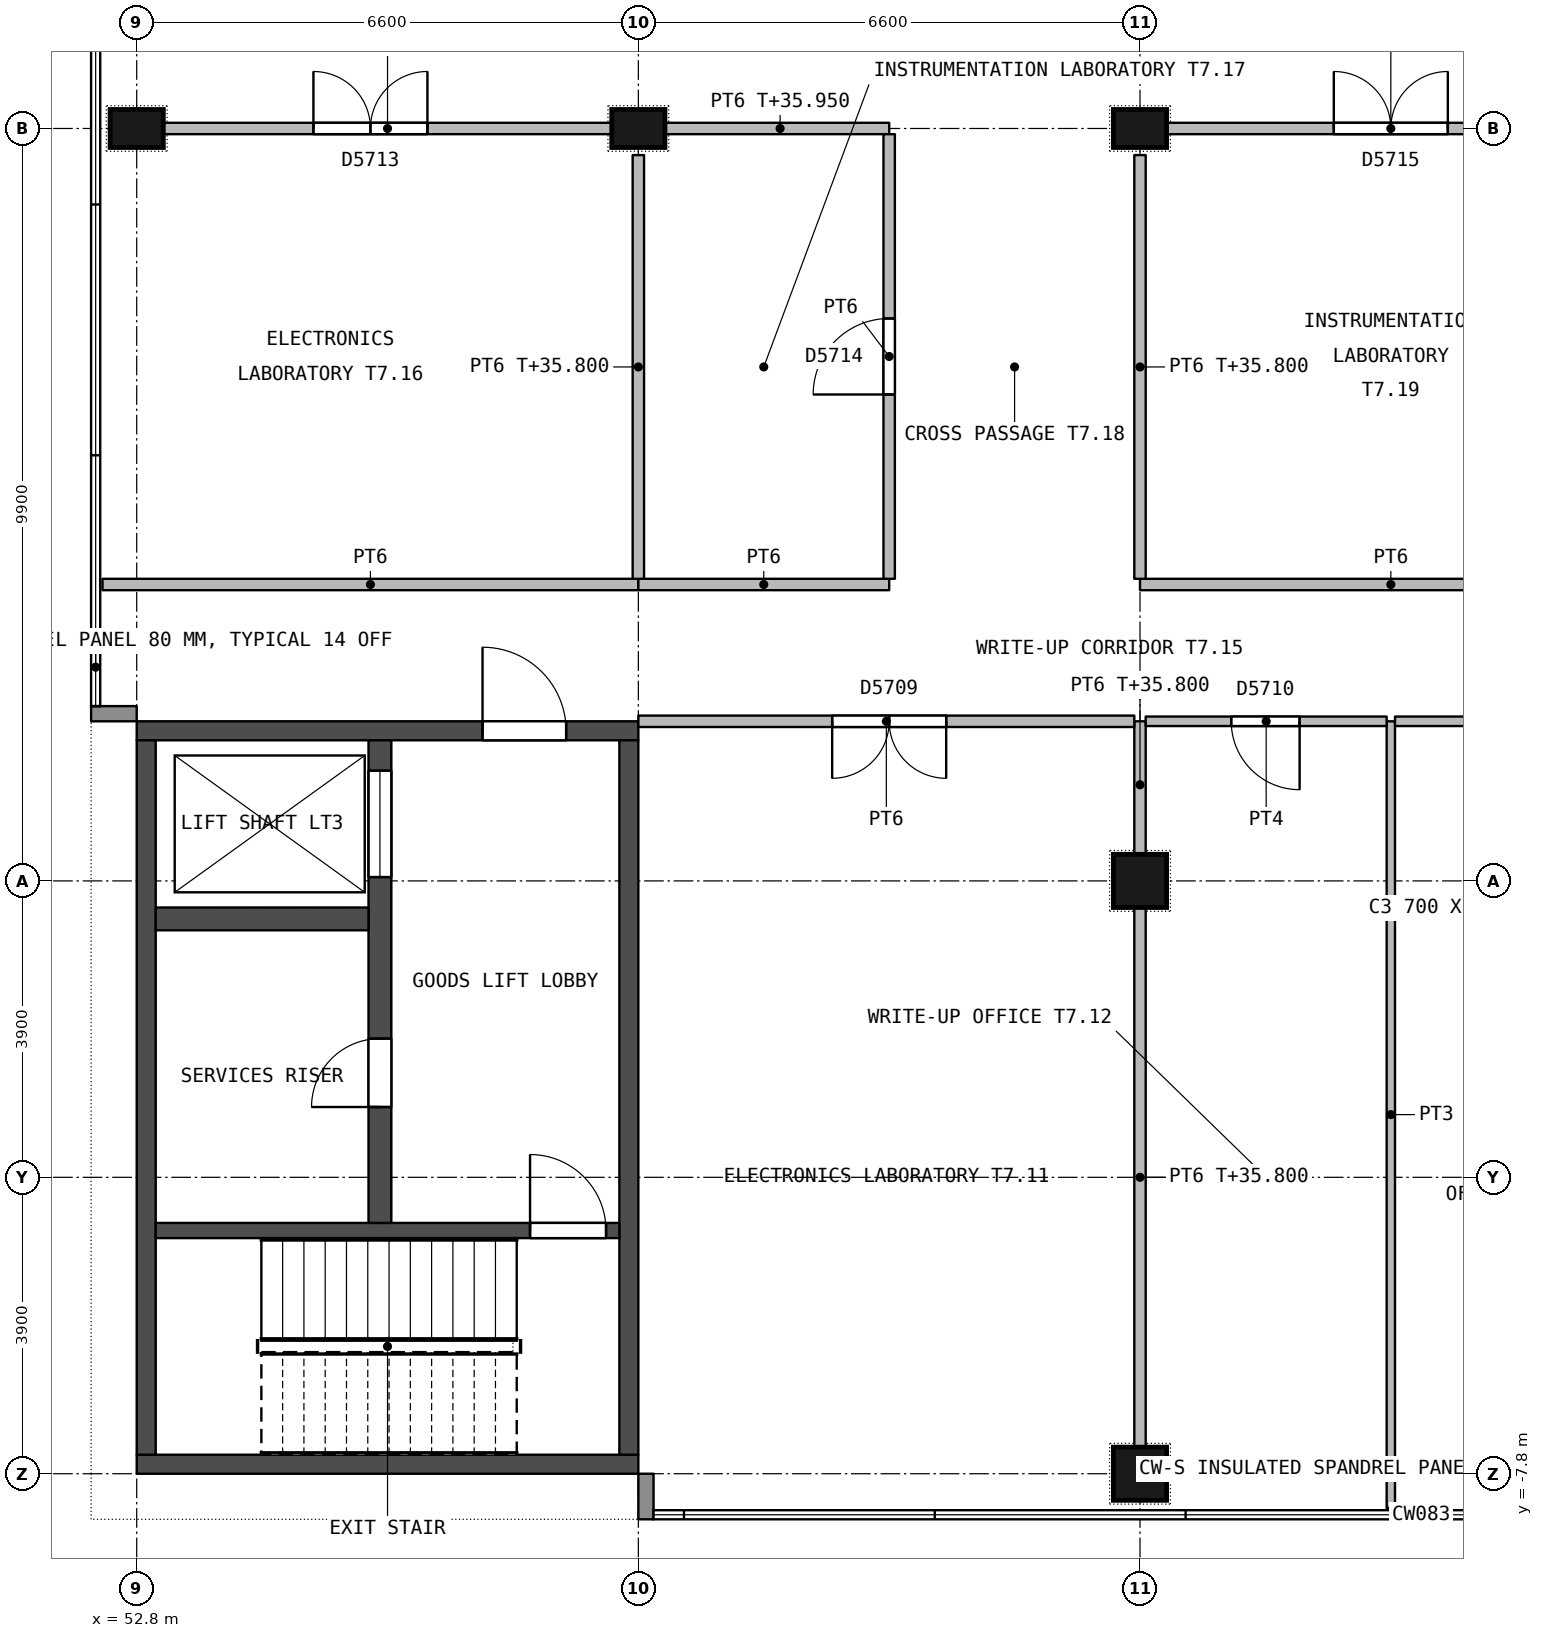
"""IFC4 building model, lengths in metres.
Left out: names, types, materials, properties, quantities, classifications, styles, units other than length and angle.
Written with IfcOpenShell. Run it as: python <this file> out.ifc"""

import sys

from ifc_helpers import new_model, si_unit, direction, frame, frame_2d, origin, origin_2d, place, context, subcontext, project, spatial, rectangle, extrude, element, fill, save


model = new_model("IFC4")
c1 = context("Model", 3, precision=1e-05, world=origin(), true_north=direction((0.0, 1.0)))
c2 = subcontext(c1, "Body", "Model", "MODEL_VIEW")
j1 = project(units=[si_unit("LENGTHUNIT", "METRE"), si_unit("PLANEANGLEUNIT", "RADIAN")], contexts=[c1])
p1 = place(None, origin())
s1 = spatial("IfcSite", under=j1, at=p1, CompositionType="ELEMENT")
p2 = place(p1, origin())
s2 = spatial("IfcBuilding", under=s1, at=p2, CompositionType="ELEMENT")
p3 = place(p2, frame((0.0, 0.0, 32.4)))
s3 = spatial("IfcBuildingStorey", under=s2, at=p3, CompositionType="ELEMENT", Elevation=32.4)
for number, where, z_axis, x_axis in (
    (1, (52.8, 9.9, 0.0), (0.0, 0.0, 1.0), (1.0, 0.0, 0.0)),
    (2, (59.4, 9.9, 0.0), (0.0, 0.0, 1.0), (1.0, 0.0, 0.0)),
):
    element("IfcColumn", number, at=place(p3, frame(where, z_axis=z_axis, x_axis=x_axis)), inside=s3, PredefinedType="COLUMN", context=c2, shape_type="SweptSolid", body=[
        extrude(rectangle(XDim=0.7, YDim=0.5, at=origin_2d()), origin(), (0.0, 0.0, 1.0), 4.5),
    ])
for number, where, z_axis, x_axis in (
    (3, (66.0, -7.8, 0.0), (0.0, 0.0, 1.0), (1.0, 0.0, 0.0)),
    (4, (66.0, 0.0, 0.0), (0.0, 0.0, 1.0), (1.0, 0.0, 0.0)),
):
    element("IfcColumn", number, at=place(p3, frame(where, z_axis=z_axis, x_axis=x_axis)), inside=s3, PredefinedType="COLUMN", context=c2, shape_type="SweptSolid", body=[
        extrude(rectangle(XDim=0.7, YDim=0.7, at=origin_2d()), origin(), (0.0, 0.0, 1.0), 4.5),
    ])
p4 = place(p3, frame((66.0, 9.9, 0.0), z_axis=(0.0, 0.0, 1.0), x_axis=(1.0, 0.0, 0.0)))
e5 = element("IfcColumn", 5, at=p4, inside=s3, PredefinedType="COLUMN", context=c2, shape_type="SweptSolid", body=[
    extrude(rectangle(XDim=0.7, YDim=0.5, at=origin_2d()), origin(), (0.0, 0.0, 1.0), 4.5),
])
p5 = place(p3, frame((59.4, 1.975, 0.0), z_axis=(0.0, 0.0, 1.0), x_axis=(-1.0, 0.0, 0.0)))
e6 = element("IfcWall", 6, at=p5, inside=s3, PredefinedType="SHEAR", context=c2, shape_type="SweptSolid", body=[
    extrude(rectangle(XDim=6.6, YDim=0.25, at=frame_2d((3.3, 0.0))), origin(), (0.0, 0.0, 1.0), 4.2),
])
p6 = place(p5, frame((0.95, 0.0, 0.0)))
e7 = element("IfcOpeningElement", 7, at=p6, cuts=e6, PredefinedType="OPENING", context=c2, shape_type="SweptSolid", body=[
    extrude(rectangle(XDim=1.1, YDim=2.1, at=frame_2d((0.55, 1.05))), frame((0.0, 0.135, 0.0), z_axis=(0.0, -1.0, 0.0), x_axis=(1.0, 0.0, 0.0)), (0.0, 0.0, 1.0), 0.27),
])
p7 = place(p3, frame((59.4, -7.675, 0.0), z_axis=(0.0, 0.0, 1.0), x_axis=(-1.0, 0.0, 0.0)))
e8 = element("IfcWall", 8, at=p7, inside=s3, PredefinedType="SHEAR", context=c2, shape_type="SweptSolid", body=[
    extrude(rectangle(XDim=6.6, YDim=0.25, at=frame_2d((3.3, 0.0))), origin(), (0.0, 0.0, 1.0), 4.2),
])
for number, where, z_axis, x_axis in (
    (9, (59.275, 1.85, 0.0), (0.0, 0.0, 1.0), (0.0, -1.0, 0.0)),
    (10, (52.925, 1.85, 0.0), (0.0, 0.0, 1.0), (0.0, -1.0, 0.0)),
):
    element("IfcWall", number, at=place(p3, frame(where, z_axis=z_axis, x_axis=x_axis)), inside=s3, PredefinedType="SHEAR", context=c2, shape_type="SweptSolid", body=[
        extrude(rectangle(XDim=9.4, YDim=0.25, at=frame_2d((4.7, 0.0))), origin(), (0.0, 0.0, 1.0), 4.2),
    ])
p8 = place(p3, frame((59.15, -4.6, 0.0), z_axis=(0.0, 0.0, 1.0), x_axis=(-1.0, 0.0, 0.0)))
e11 = element("IfcWall", 11, at=p8, inside=s3, PredefinedType="SHEAR", context=c2, shape_type="SweptSolid", body=[
    extrude(rectangle(XDim=6.1, YDim=0.2, at=frame_2d((3.05, 0.0))), origin(), (0.0, 0.0, 1.0), 4.2),
])
p9 = place(p8, frame((0.175, 0.0, 0.0)))
e12 = element("IfcOpeningElement", 12, at=p9, cuts=e11, PredefinedType="OPENING", context=c2, shape_type="SweptSolid", body=[
    extrude(rectangle(XDim=1.0, YDim=2.1, at=frame_2d((0.5, 1.05))), frame((0.0, 0.11, 0.0), z_axis=(0.0, -1.0, 0.0), x_axis=(1.0, 0.0, 0.0)), (0.0, 0.0, 1.0), 0.22),
])
p10 = place(p3, frame((56.0, 1.85, 0.0), z_axis=(0.0, 0.0, 1.0), x_axis=(0.0, -1.0, 0.0)))
e13 = element("IfcWall", 13, at=p10, inside=s3, PredefinedType="SHEAR", context=c2, shape_type="SweptSolid", body=[
    extrude(rectangle(XDim=6.35, YDim=0.3, at=frame_2d((3.175, 0.0))), origin(), (0.0, 0.0, 1.0), 4.2),
])
p11 = place(p10, frame((3.925, 0.0, 0.0)))
e14 = element("IfcOpeningElement", 14, at=p11, cuts=e13, PredefinedType="OPENING", context=c2, shape_type="SweptSolid", body=[
    extrude(rectangle(XDim=0.9, YDim=2.1, at=frame_2d((0.45, 1.05))), frame((0.0, 0.16, 0.0), z_axis=(0.0, -1.0, 0.0), x_axis=(1.0, 0.0, 0.0)), (0.0, 0.0, 1.0), 0.32),
])
p12 = place(p10, frame((0.4, 0.0, 0.0)))
e15 = element("IfcOpeningElement", 15, at=p12, cuts=e13, PredefinedType="OPENING", context=c2, shape_type="SweptSolid", body=[
    extrude(rectangle(XDim=1.4, YDim=2.4, at=frame_2d((0.7, 1.2))), frame((0.0, 0.16, 0.0), z_axis=(0.0, -1.0, 0.0), x_axis=(1.0, 0.0, 0.0)), (0.0, 0.0, 1.0), 0.32),
])
p13 = place(p3, frame((55.85, -0.5, 0.0), z_axis=(0.0, 0.0, 1.0), x_axis=(-1.0, 0.0, 0.0)))
e16 = element("IfcWall", 16, at=p13, inside=s3, PredefinedType="SHEAR", context=c2, shape_type="SweptSolid", body=[
    extrude(rectangle(XDim=2.8, YDim=0.3, at=frame_2d((1.4, 0.0))), origin(), (0.0, 0.0, 1.0), 4.2),
])
p14 = place(p3, frame((59.5, -7.8, 0.0), z_axis=(0.0, 0.0, 1.0), x_axis=(0.0, -1.0, 0.0)))
e17 = element("IfcWall", 17, at=p14, inside=s3, PredefinedType="STANDARD", context=c2, shape_type="SweptSolid", body=[
    extrude(rectangle(XDim=0.6, YDim=0.2, at=frame_2d((0.3, 0.0))), origin(), (0.0, 0.0, 1.0), 3.55),
])
p15 = place(p3, frame((52.8, 2.2, 0.0), z_axis=(0.0, 0.0, 1.0), x_axis=(-1.0, 0.0, 0.0)))
e18 = element("IfcWall", 18, at=p15, inside=s3, PredefinedType="STANDARD", context=c2, shape_type="SweptSolid", body=[
    extrude(rectangle(XDim=0.6, YDim=0.2, at=frame_2d((0.3, 0.0))), origin(), (0.0, 0.0, 1.0), 3.55),
])
p16 = place(p3, frame((53.15, 9.9, 0.0), z_axis=(0.0, 0.0, 1.0), x_axis=(1.0, 0.0, 0.0)))
e19 = element("IfcWall", 19, at=p16, inside=s3, PredefinedType="PARTITIONING", context=c2, shape_type="SweptSolid", body=[
    extrude(rectangle(XDim=5.9, YDim=0.15, at=frame_2d((2.95, 0.0))), origin(), (0.0, 0.0, 1.0), 3.55),
])
p17 = place(p16, frame((1.975, 0.0, 0.0)))
e20 = element("IfcOpeningElement", 20, at=p17, cuts=e19, PredefinedType="OPENING", context=c2, shape_type="SweptSolid", body=[
    extrude(rectangle(XDim=1.5, YDim=2.1, at=frame_2d((0.75, 1.05))), frame((0.0, 0.085, 0.0), z_axis=(0.0, -1.0, 0.0), x_axis=(1.0, 0.0, 0.0)), (0.0, 0.0, 1.0), 0.17),
])
p18 = place(p3, frame((59.75, 9.9, 0.0), z_axis=(0.0, 0.0, 1.0), x_axis=(1.0, 0.0, 0.0)))
e21 = element("IfcWall", 21, at=p18, inside=s3, PredefinedType="PARTITIONING", context=c2, shape_type="SweptSolid", body=[
    extrude(rectangle(XDim=2.95, YDim=0.15, at=frame_2d((1.475, 0.0))), origin(), (0.0, 0.0, 1.0), 3.55),
])
p19 = place(p3, frame((66.35, 9.9, 0.0), z_axis=(0.0, 0.0, 1.0), x_axis=(1.0, 0.0, 0.0)))
e22 = element("IfcWall", 22, at=p19, inside=s3, PredefinedType="PARTITIONING", context=c2, shape_type="SweptSolid", body=[
    extrude(rectangle(XDim=5.9, YDim=0.15, at=frame_2d((2.95, 0.0))), origin(), (0.0, 0.0, 1.0), 3.55),
])
p20 = place(p19, frame((2.2, 0.0, 0.0)))
e23 = element("IfcOpeningElement", 23, at=p20, cuts=e22, PredefinedType="OPENING", context=c2, shape_type="SweptSolid", body=[
    extrude(rectangle(XDim=1.5, YDim=2.1, at=frame_2d((0.75, 1.05))), frame((0.0, 0.085, 0.0), z_axis=(0.0, -1.0, 0.0), x_axis=(1.0, 0.0, 0.0)), (0.0, 0.0, 1.0), 0.17),
])
p21 = place(p3, frame((66.0, -7.45, 0.0), z_axis=(0.0, 0.0, 1.0), x_axis=(0.0, 1.0, 0.0)))
e24 = element("IfcWall", 24, at=p21, inside=s3, PredefinedType="PARTITIONING", context=c2, shape_type="SweptSolid", body=[
    extrude(rectangle(XDim=7.1, YDim=0.15, at=frame_2d((3.55, 0.0))), origin(), (0.0, 0.0, 1.0), 3.4),
])
p22 = place(p3, frame((66.0, 0.35, 0.0), z_axis=(0.0, 0.0, 1.0), x_axis=(0.0, 1.0, 0.0)))
e25 = element("IfcWall", 25, at=p22, inside=s3, PredefinedType="PARTITIONING", context=c2, shape_type="SweptSolid", body=[
    extrude(rectangle(XDim=1.75, YDim=0.15, at=frame_2d((0.875, 0.0))), origin(), (0.0, 0.0, 1.0), 3.4),
])
p23 = place(p3, frame((65.925, 2.1, 0.0), z_axis=(0.0, 0.0, 1.0), x_axis=(-1.0, 0.0, 0.0)))
e26 = element("IfcWall", 26, at=p23, inside=s3, PredefinedType="PARTITIONING", context=c2, shape_type="SweptSolid", body=[
    extrude(rectangle(XDim=6.525, YDim=0.15, at=frame_2d((3.262, 0.0))), origin(), (0.0, 0.0, 1.0), 4.2),
])
p24 = place(p23, frame((2.475, 0.0, 0.0)))
e27 = element("IfcOpeningElement", 27, at=p24, cuts=e26, PredefinedType="OPENING", context=c2, shape_type="SweptSolid", body=[
    extrude(rectangle(XDim=1.5, YDim=2.1, at=frame_2d((0.75, 1.05))), frame((0.0, 0.085, 0.0), z_axis=(0.0, -1.0, 0.0), x_axis=(1.0, 0.0, 0.0)), (0.0, 0.0, 1.0), 0.17),
])
p25 = place(p3, frame((69.3, -8.25, 0.0), z_axis=(0.0, 0.0, 1.0), x_axis=(0.0, 1.0, 0.0)))
e28 = element("IfcWall", 28, at=p25, inside=s3, PredefinedType="PARTITIONING", context=c2, shape_type="SweptSolid", body=[
    extrude(rectangle(XDim=10.35, YDim=0.11, at=frame_2d((5.175, 0.0))), origin(), (0.0, 0.0, 1.0), 4.2),
])
p26 = place(p3, frame((69.245, 2.1, 0.0), z_axis=(0.0, 0.0, 1.0), x_axis=(-1.0, 0.0, 0.0)))
e29 = element("IfcWall", 29, at=p26, inside=s3, PredefinedType="PARTITIONING", context=c2, shape_type="SweptSolid", body=[
    extrude(rectangle(XDim=3.17, YDim=0.125, at=frame_2d((1.585, 0.0))), origin(), (0.0, 0.0, 1.0), 4.2),
])
p27 = place(p26, frame((1.145, 0.0, 0.0)))
e30 = element("IfcOpeningElement", 30, at=p27, cuts=e29, PredefinedType="OPENING", context=c2, shape_type="SweptSolid", body=[
    extrude(rectangle(XDim=0.9, YDim=2.1, at=frame_2d((0.45, 1.05))), frame((0.0, 0.073, 0.0), z_axis=(0.0, -1.0, 0.0), x_axis=(1.0, 0.0, 0.0)), (0.0, 0.0, 1.0), 0.145),
])
p28 = place(p3, frame((72.525, 2.1, 0.0), z_axis=(0.0, 0.0, 1.0), x_axis=(-1.0, 0.0, 0.0)))
e31 = element("IfcWall", 31, at=p28, inside=s3, PredefinedType="PARTITIONING", context=c2, shape_type="SweptSolid", body=[
    extrude(rectangle(XDim=3.17, YDim=0.125, at=frame_2d((1.585, 0.0))), origin(), (0.0, 0.0, 1.0), 4.2),
])
p29 = place(p28, frame((1.125, 0.0, 0.0)))
e32 = element("IfcOpeningElement", 32, at=p29, cuts=e31, PredefinedType="OPENING", context=c2, shape_type="SweptSolid", body=[
    extrude(rectangle(XDim=0.9, YDim=2.1, at=frame_2d((0.45, 1.05))), frame((0.0, 0.073, 0.0), z_axis=(0.0, -1.0, 0.0), x_axis=(1.0, 0.0, 0.0)), (0.0, 0.0, 1.0), 0.145),
])
p30 = place(p3, frame((59.4, 3.9, 0.0), z_axis=(0.0, 0.0, 1.0), x_axis=(-1.0, 0.0, 0.0)))
e33 = element("IfcWall", 33, at=p30, inside=s3, PredefinedType="PARTITIONING", context=c2, shape_type="SweptSolid", body=[
    extrude(rectangle(XDim=7.05, YDim=0.15, at=frame_2d((3.525, 0.0))), origin(), (0.0, 0.0, 1.0), 4.2),
])
p31 = place(p3, frame((62.7, 3.9, 0.0), z_axis=(0.0, 0.0, 1.0), x_axis=(-1.0, 0.0, 0.0)))
e34 = element("IfcWall", 34, at=p31, inside=s3, PredefinedType="PARTITIONING", context=c2, shape_type="SweptSolid", body=[
    extrude(rectangle(XDim=3.3, YDim=0.15, at=frame_2d((1.65, 0.0))), origin(), (0.0, 0.0, 1.0), 4.2),
])
p32 = place(p3, frame((72.6, 3.9, 0.0), z_axis=(0.0, 0.0, 1.0), x_axis=(-1.0, 0.0, 0.0)))
e35 = element("IfcWall", 35, at=p32, inside=s3, PredefinedType="PARTITIONING", context=c2, shape_type="SweptSolid", body=[
    extrude(rectangle(XDim=6.6, YDim=0.15, at=frame_2d((3.3, 0.0))), origin(), (0.0, 0.0, 1.0), 4.2),
])
p33 = place(p3, frame((59.4, 3.975, 0.0), z_axis=(0.0, 0.0, 1.0), x_axis=(0.0, 1.0, 0.0)))
e36 = element("IfcWall", 36, at=p33, inside=s3, PredefinedType="PARTITIONING", context=c2, shape_type="SweptSolid", body=[
    extrude(rectangle(XDim=5.575, YDim=0.15, at=frame_2d((2.788, 0.0))), origin(), (0.0, 0.0, 1.0), 3.4),
])
p34 = place(p3, frame((62.7, 9.825, 0.0), z_axis=(0.0, 0.0, 1.0), x_axis=(0.0, -1.0, 0.0)))
e37 = element("IfcWall", 37, at=p34, inside=s3, PredefinedType="PARTITIONING", context=c2, shape_type="SweptSolid", body=[
    extrude(rectangle(XDim=5.85, YDim=0.15, at=frame_2d((2.925, 0.0))), origin(), (0.0, 0.0, 1.0), 4.2),
])
p35 = place(p34, frame((2.425, 0.0, 0.0)))
e38 = element("IfcOpeningElement", 38, at=p35, cuts=e37, PredefinedType="OPENING", context=c2, shape_type="SweptSolid", body=[
    extrude(rectangle(XDim=1.0, YDim=2.1, at=frame_2d((0.5, 1.05))), frame((0.0, 0.085, 0.0), z_axis=(0.0, -1.0, 0.0), x_axis=(1.0, 0.0, 0.0)), (0.0, 0.0, 1.0), 0.17),
])
p36 = place(p3, frame((66.0, 3.975, 0.0), z_axis=(0.0, 0.0, 1.0), x_axis=(0.0, 1.0, 0.0)))
e39 = element("IfcWall", 39, at=p36, inside=s3, PredefinedType="PARTITIONING", context=c2, shape_type="SweptSolid", body=[
    extrude(rectangle(XDim=5.575, YDim=0.15, at=frame_2d((2.788, 0.0))), origin(), (0.0, 0.0, 1.0), 3.4),
])
p37 = place(p11, origin())
e40 = element("IfcDoor", 40, at=p37, inside=s3, OperationType="SINGLE_SWING_RIGHT", PredefinedType="DOOR", context=c2, shape_type="SweptSolid", body=[
    extrude(rectangle(XDim=0.9, YDim=2.1, at=frame_2d((0.45, 1.05))), frame((0.0, 0.025, 0.0), z_axis=(0.0, -1.0, 0.0), x_axis=(1.0, 0.0, 0.0)), (0.0, 0.0, 1.0), 0.05),
])
fill(e14, e40)
p38 = place(p6, origin())
e41 = element("IfcDoor", 41, at=p38, inside=s3, OperationType="SINGLE_SWING_RIGHT", PredefinedType="DOOR", context=c2, shape_type="SweptSolid", body=[
    extrude(rectangle(XDim=1.1, YDim=2.1, at=frame_2d((0.55, 1.05))), frame((0.0, 0.025, 0.0), z_axis=(0.0, -1.0, 0.0), x_axis=(1.0, 0.0, 0.0)), (0.0, 0.0, 1.0), 0.05),
])
fill(e7, e41)
p39 = place(p9, origin())
e42 = element("IfcDoor", 42, at=p39, inside=s3, OperationType="SINGLE_SWING_RIGHT", PredefinedType="DOOR", context=c2, shape_type="SweptSolid", body=[
    extrude(rectangle(XDim=1.0, YDim=2.1, at=frame_2d((0.5, 1.05))), frame((0.0, 0.025, 0.0), z_axis=(0.0, -1.0, 0.0), x_axis=(1.0, 0.0, 0.0)), (0.0, 0.0, 1.0), 0.05),
])
fill(e12, e42)
p40 = place(p12, origin())
e43 = element("IfcDoor", 43, at=p40, inside=s3, OperationType="DOUBLE_DOOR_SLIDING", PredefinedType="NOTDEFINED", context=c2, shape_type="SweptSolid", body=[
    extrude(rectangle(XDim=1.4, YDim=2.4, at=frame_2d((0.7, 1.2))), frame((0.0, 0.025, 0.0), z_axis=(0.0, -1.0, 0.0), x_axis=(1.0, 0.0, 0.0)), (0.0, 0.0, 1.0), 0.05),
])
fill(e15, e43)
p41 = place(p24, origin())
e44 = element("IfcDoor", 44, at=p41, inside=s3, OperationType="DOUBLE_DOOR_SINGLE_SWING", PredefinedType="DOOR", context=c2, shape_type="SweptSolid", body=[
    extrude(rectangle(XDim=1.5, YDim=2.1, at=frame_2d((0.75, 1.05))), frame((0.0, 0.027, 0.0), z_axis=(0.0, -1.0, 0.0), x_axis=(1.0, 0.0, 0.0)), (0.0, 0.0, 1.0), 0.054),
])
fill(e27, e44)
p42 = place(p27, origin())
e45 = element("IfcDoor", 45, at=p42, inside=s3, OperationType="SINGLE_SWING_LEFT", PredefinedType="DOOR", context=c2, shape_type="SweptSolid", body=[
    extrude(rectangle(XDim=0.9, YDim=2.1, at=frame_2d((0.45, 1.05))), frame((0.0, 0.027, 0.0), z_axis=(0.0, -1.0, 0.0), x_axis=(1.0, 0.0, 0.0)), (0.0, 0.0, 1.0), 0.054),
])
fill(e30, e45)
p43 = place(p17, origin())
e46 = element("IfcDoor", 46, at=p43, inside=s3, OperationType="DOUBLE_DOOR_SINGLE_SWING", PredefinedType="DOOR", context=c2, shape_type="SweptSolid", body=[
    extrude(rectangle(XDim=1.5, YDim=2.1, at=frame_2d((0.75, 1.05))), frame((0.0, 0.027, 0.0), z_axis=(0.0, -1.0, 0.0), x_axis=(1.0, 0.0, 0.0)), (0.0, 0.0, 1.0), 0.054),
])
fill(e20, e46)
p44 = place(p35, origin())
e47 = element("IfcDoor", 47, at=p44, inside=s3, OperationType="SINGLE_SWING_RIGHT", PredefinedType="DOOR", context=c2, shape_type="SweptSolid", body=[
    extrude(rectangle(XDim=1.0, YDim=2.1, at=frame_2d((0.5, 1.05))), frame((0.0, 0.027, 0.0), z_axis=(0.0, -1.0, 0.0), x_axis=(1.0, 0.0, 0.0)), (0.0, 0.0, 1.0), 0.054),
])
fill(e38, e47)
p45 = place(p20, origin())
e48 = element("IfcDoor", 48, at=p45, inside=s3, OperationType="DOUBLE_DOOR_SINGLE_SWING", PredefinedType="DOOR", context=c2, shape_type="SweptSolid", body=[
    extrude(rectangle(XDim=1.5, YDim=2.1, at=frame_2d((0.75, 1.05))), frame((0.0, 0.027, 0.0), z_axis=(0.0, -1.0, 0.0), x_axis=(1.0, 0.0, 0.0)), (0.0, 0.0, 1.0), 0.054),
])
fill(e23, e48)
save(model, sys.argv[1])
